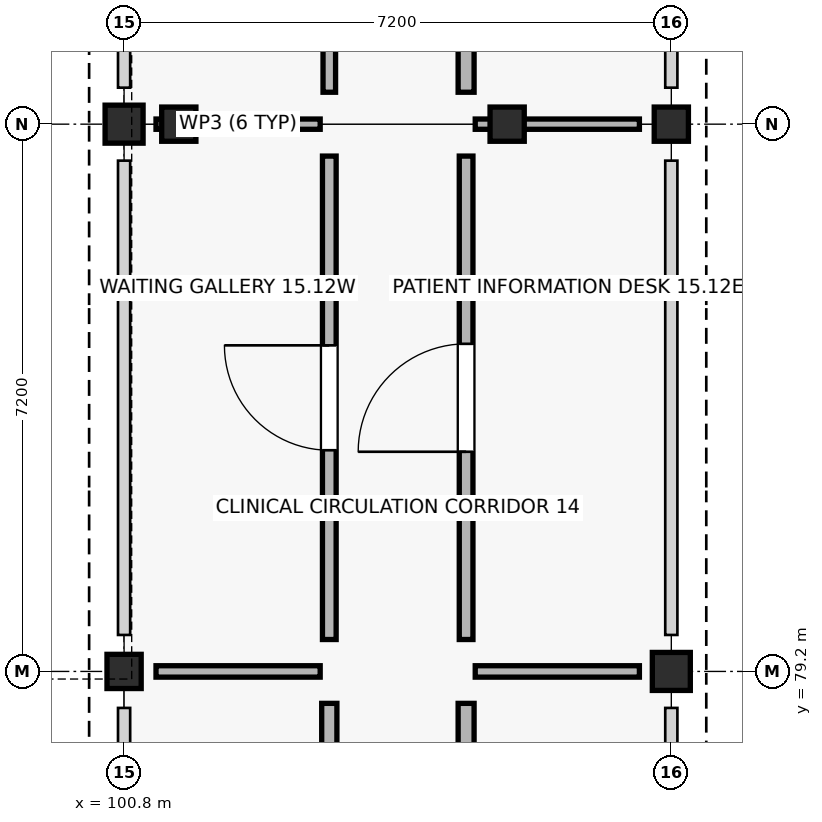
"""IFC4 building model, lengths in metres.
Left out: names, types, materials, properties, quantities, classifications, styles, units other than length and angle.
Written with IfcOpenShell. Run it as: python <this file> out.ifc"""

import sys

from ifc_helpers import new_model, si_unit, direction, frame, frame_2d, origin, origin_2d, place, context, subcontext, project, spatial, rectangle, extrude, element, fill, save


model = new_model("IFC4")
c1 = context("Model", 3, precision=1e-05, world=origin(), true_north=direction((0.0, 1.0)))
c2 = subcontext(c1, "Body", "Model", "MODEL_VIEW")
j1 = project(units=[si_unit("LENGTHUNIT", "METRE"), si_unit("PLANEANGLEUNIT", "RADIAN")], contexts=[c1])
p1 = place(None, origin())
s1 = spatial("IfcSite", under=j1, at=p1, CompositionType="ELEMENT")
p2 = place(p1, origin())
s2 = spatial("IfcBuilding", under=s1, at=p2, CompositionType="ELEMENT")
p3 = place(p2, frame((0.0, 0.0, 4.5)))
s3 = spatial("IfcBuildingStorey", under=s2, at=p3, CompositionType="ELEMENT", Elevation=4.5)
p4 = place(p3, frame((100.8, 79.2, 0.0), z_axis=(0.0, 0.0, 1.0), x_axis=(1.0, 0.0, 0.0)))
e1 = element("IfcColumn", 1, at=p4, inside=s3, PredefinedType="COLUMN", context=c2, shape_type="SweptSolid", body=[
    extrude(rectangle(XDim=0.45, YDim=0.45, at=origin_2d()), origin(), (0.0, 0.0, 1.0), 4.28),
])
p5 = place(p3, frame((100.8, 86.4, 0.0), z_axis=(0.0, 0.0, 1.0), x_axis=(1.0, 0.0, 0.0)))
e2 = element("IfcColumn", 2, at=p5, inside=s3, PredefinedType="COLUMN", context=c2, shape_type="SweptSolid", body=[
    extrude(rectangle(XDim=0.5, YDim=0.5, at=origin_2d()), origin(), (0.0, 0.0, 1.0), 12.72),
])
p6 = place(p3, frame((108.0, 79.2, 0.0), z_axis=(0.0, 0.0, 1.0), x_axis=(1.0, 0.0, 0.0)))
e3 = element("IfcColumn", 3, at=p6, inside=s3, PredefinedType="COLUMN", context=c2, shape_type="SweptSolid", body=[
    extrude(rectangle(XDim=0.5, YDim=0.5, at=origin_2d()), origin(), (0.0, 0.0, 1.0), 4.28),
])
p7 = place(p3, frame((108.0, 86.4, 0.0), z_axis=(0.0, 0.0, 1.0), x_axis=(1.0, 0.0, 0.0)))
e4 = element("IfcColumn", 4, at=p7, inside=s3, PredefinedType="COLUMN", context=c2, shape_type="SweptSolid", body=[
    extrude(rectangle(XDim=0.45, YDim=0.45, at=origin_2d()), origin(), (0.0, 0.0, 1.0), 12.72),
])
for number, where, z_axis, x_axis in (
    (5, (101.52, 86.4, 12.295), (0.0, 0.0, 1.0), (1.0, 0.0, 0.0)),
    (6, (105.84, 86.4, 12.295), (0.0, 0.0, 1.0), (1.0, 0.0, 0.0)),
):
    element("IfcColumn", number, at=place(p3, frame(where, z_axis=z_axis, x_axis=x_axis)), inside=s3, PredefinedType="COLUMN", context=c2, shape_type="SweptSolid", body=[
        extrude(rectangle(XDim=0.45, YDim=0.45, at=origin_2d()), origin(), (0.0, 0.0, 1.0), 3.405),
    ])
p8 = place(p3, frame((103.5, 72.42, 0.0), z_axis=(0.0, 0.0, 1.0), x_axis=(0.0, 1.0, 0.0)))
e7 = element("IfcWall", 7, at=p8, inside=s3, PredefinedType="SOLIDWALL", context=c2, shape_type="SweptSolid", body=[
    extrude(rectangle(XDim=6.36, YDim=0.2, at=frame_2d((3.18, 0.0))), origin(), (0.0, 0.0, 1.0), 3.36),
])
p9 = place(p8, frame((2.53, 0.0, 0.0)))
e8 = element("IfcOpeningElement", 8, at=p9, cuts=e7, PredefinedType="OPENING", context=c2, shape_type="SweptSolid", body=[
    extrude(rectangle(XDim=1.3, YDim=2.14, at=frame_2d((0.65, 1.07))), frame((0.0, 0.11, 0.0), z_axis=(0.0, -1.0, 0.0), x_axis=(1.0, 0.0, 0.0)), (0.0, 0.0, 1.0), 0.22),
])
p10 = place(p3, frame((101.22, 79.2, 0.0), z_axis=(0.0, 0.0, 1.0), x_axis=(1.0, 0.0, 0.0)))
e9 = element("IfcWall", 9, at=p10, inside=s3, PredefinedType="PARTITIONING", context=c2, shape_type="SweptSolid", body=[
    extrude(rectangle(XDim=2.16, YDim=0.15, at=frame_2d((1.08, 0.0))), origin(), (0.0, 0.0, 1.0), 3.36),
])
p11 = place(p3, frame((105.3, 72.42, 0.0), z_axis=(0.0, 0.0, 1.0), x_axis=(0.0, 1.0, 0.0)))
e10 = element("IfcWall", 10, at=p11, inside=s3, PredefinedType="PLUMBINGWALL", context=c2, shape_type="SweptSolid", body=[
    extrude(rectangle(XDim=6.36, YDim=0.21, at=frame_2d((3.18, 0.0))), origin(), (0.0, 0.0, 1.0), 3.36),
])
p12 = place(p11, frame((2.51, 0.0, 0.0)))
e11 = element("IfcOpeningElement", 11, at=p12, cuts=e10, PredefinedType="OPENING", context=c2, shape_type="SweptSolid", body=[
    extrude(rectangle(XDim=1.34, YDim=2.14, at=frame_2d((0.67, 1.07))), frame((0.0, 0.115, 0.0), z_axis=(0.0, -1.0, 0.0), x_axis=(1.0, 0.0, 0.0)), (0.0, 0.0, 1.0), 0.23),
])
p13 = place(p3, frame((105.42, 79.2, 0.0), z_axis=(0.0, 0.0, 1.0), x_axis=(1.0, 0.0, 0.0)))
e12 = element("IfcWall", 12, at=p13, inside=s3, PredefinedType="PARTITIONING", context=c2, shape_type="SweptSolid", body=[
    extrude(rectangle(XDim=2.16, YDim=0.15, at=frame_2d((1.08, 0.0))), origin(), (0.0, 0.0, 1.0), 3.36),
])
p14 = place(p3, frame((103.5, 79.62, 0.0), z_axis=(0.0, 0.0, 1.0), x_axis=(0.0, 1.0, 0.0)))
e13 = element("IfcWall", 13, at=p14, inside=s3, PredefinedType="PARTITIONING", context=c2, shape_type="SweptSolid", body=[
    extrude(rectangle(XDim=6.36, YDim=0.18, at=frame_2d((3.18, 0.0))), origin(), (0.0, 0.0, 1.0), 3.36),
])
p15 = place(p14, frame((2.49, 0.0, 0.0)))
e14 = element("IfcOpeningElement", 14, at=p15, cuts=e13, PredefinedType="OPENING", context=c2, shape_type="SweptSolid", body=[
    extrude(rectangle(XDim=1.38, YDim=2.14, at=frame_2d((0.69, 1.07))), frame((0.0, 0.1, 0.0), z_axis=(0.0, -1.0, 0.0), x_axis=(1.0, 0.0, 0.0)), (0.0, 0.0, 1.0), 0.2),
])
p16 = place(p3, frame((101.22, 86.4, 0.0), z_axis=(0.0, 0.0, 1.0), x_axis=(1.0, 0.0, 0.0)))
e15 = element("IfcWall", 15, at=p16, inside=s3, PredefinedType="PARTITIONING", context=c2, shape_type="SweptSolid", body=[
    extrude(rectangle(XDim=2.16, YDim=0.135, at=frame_2d((1.08, 0.0))), origin(), (0.0, 0.0, 1.0), 3.36),
])
p17 = place(p3, frame((105.3, 79.62, 0.0), z_axis=(0.0, 0.0, 1.0), x_axis=(0.0, 1.0, 0.0)))
e16 = element("IfcWall", 16, at=p17, inside=s3, PredefinedType="PARTITIONING", context=c2, shape_type="SweptSolid", body=[
    extrude(rectangle(XDim=6.36, YDim=0.18, at=frame_2d((3.18, 0.0))), origin(), (0.0, 0.0, 1.0), 3.36),
])
p18 = place(p17, frame((2.47, 0.0, 0.0)))
e17 = element("IfcOpeningElement", 17, at=p18, cuts=e16, PredefinedType="OPENING", context=c2, shape_type="SweptSolid", body=[
    extrude(rectangle(XDim=1.42, YDim=2.14, at=frame_2d((0.71, 1.07))), frame((0.0, 0.1, 0.0), z_axis=(0.0, -1.0, 0.0), x_axis=(1.0, 0.0, 0.0)), (0.0, 0.0, 1.0), 0.2),
])
p19 = place(p3, frame((105.42, 86.4, 0.0), z_axis=(0.0, 0.0, 1.0), x_axis=(1.0, 0.0, 0.0)))
e18 = element("IfcWall", 18, at=p19, inside=s3, PredefinedType="PARTITIONING", context=c2, shape_type="SweptSolid", body=[
    extrude(rectangle(XDim=2.16, YDim=0.135, at=frame_2d((1.08, 0.0))), origin(), (0.0, 0.0, 1.0), 3.36),
])
p20 = place(p3, frame((103.5, 86.82, 0.0), z_axis=(0.0, 0.0, 1.0), x_axis=(0.0, 1.0, 0.0)))
e19 = element("IfcWall", 19, at=p20, inside=s3, PredefinedType="PARTITIONING", context=c2, shape_type="SweptSolid", body=[
    extrude(rectangle(XDim=6.36, YDim=0.165, at=frame_2d((3.18, 0.0))), origin(), (0.0, 0.0, 1.0), 3.36),
])
p21 = place(p20, frame((2.45, 0.0, 0.0)))
e20 = element("IfcOpeningElement", 20, at=p21, cuts=e19, PredefinedType="OPENING", context=c2, shape_type="SweptSolid", body=[
    extrude(rectangle(XDim=1.46, YDim=2.14, at=frame_2d((0.73, 1.07))), frame((0.0, 0.093, 0.0), z_axis=(0.0, -1.0, 0.0), x_axis=(1.0, 0.0, 0.0)), (0.0, 0.0, 1.0), 0.185),
])
p22 = place(p3, frame((105.3, 86.82, 0.0), z_axis=(0.0, 0.0, 1.0), x_axis=(0.0, 1.0, 0.0)))
e21 = element("IfcWall", 21, at=p22, inside=s3, PredefinedType="PLUMBINGWALL", context=c2, shape_type="SweptSolid", body=[
    extrude(rectangle(XDim=6.36, YDim=0.21, at=frame_2d((3.18, 0.0))), origin(), (0.0, 0.0, 1.0), 3.36),
])
p23 = place(p22, frame((2.43, 0.0, 0.0)))
e22 = element("IfcOpeningElement", 22, at=p23, cuts=e21, PredefinedType="OPENING", context=c2, shape_type="SweptSolid", body=[
    extrude(rectangle(XDim=1.5, YDim=2.14, at=frame_2d((0.75, 1.07))), frame((0.0, 0.115, 0.0), z_axis=(0.0, -1.0, 0.0), x_axis=(1.0, 0.0, 0.0)), (0.0, 0.0, 1.0), 0.23),
])
p24 = place(p15, origin())
e23 = element("IfcDoor", 23, at=p24, inside=s3, OperationType="SINGLE_SWING_RIGHT", PredefinedType="DOOR", context=c2, shape_type="SweptSolid", body=[
    extrude(rectangle(XDim=1.38, YDim=2.14, at=frame_2d((0.69, 1.07))), frame((0.0, 0.025, 0.0), z_axis=(0.0, -1.0, 0.0), x_axis=(1.0, 0.0, 0.0)), (0.0, 0.0, 1.0), 0.05),
])
fill(e14, e23)
p25 = place(p18, origin())
e24 = element("IfcDoor", 24, at=p25, inside=s3, OperationType="SINGLE_SWING_LEFT", PredefinedType="DOOR", context=c2, shape_type="SweptSolid", body=[
    extrude(rectangle(XDim=1.42, YDim=2.14, at=frame_2d((0.71, 1.07))), frame((0.0, 0.025, 0.0), z_axis=(0.0, -1.0, 0.0), x_axis=(1.0, 0.0, 0.0)), (0.0, 0.0, 1.0), 0.05),
])
fill(e17, e24)
save(model, sys.argv[1])
